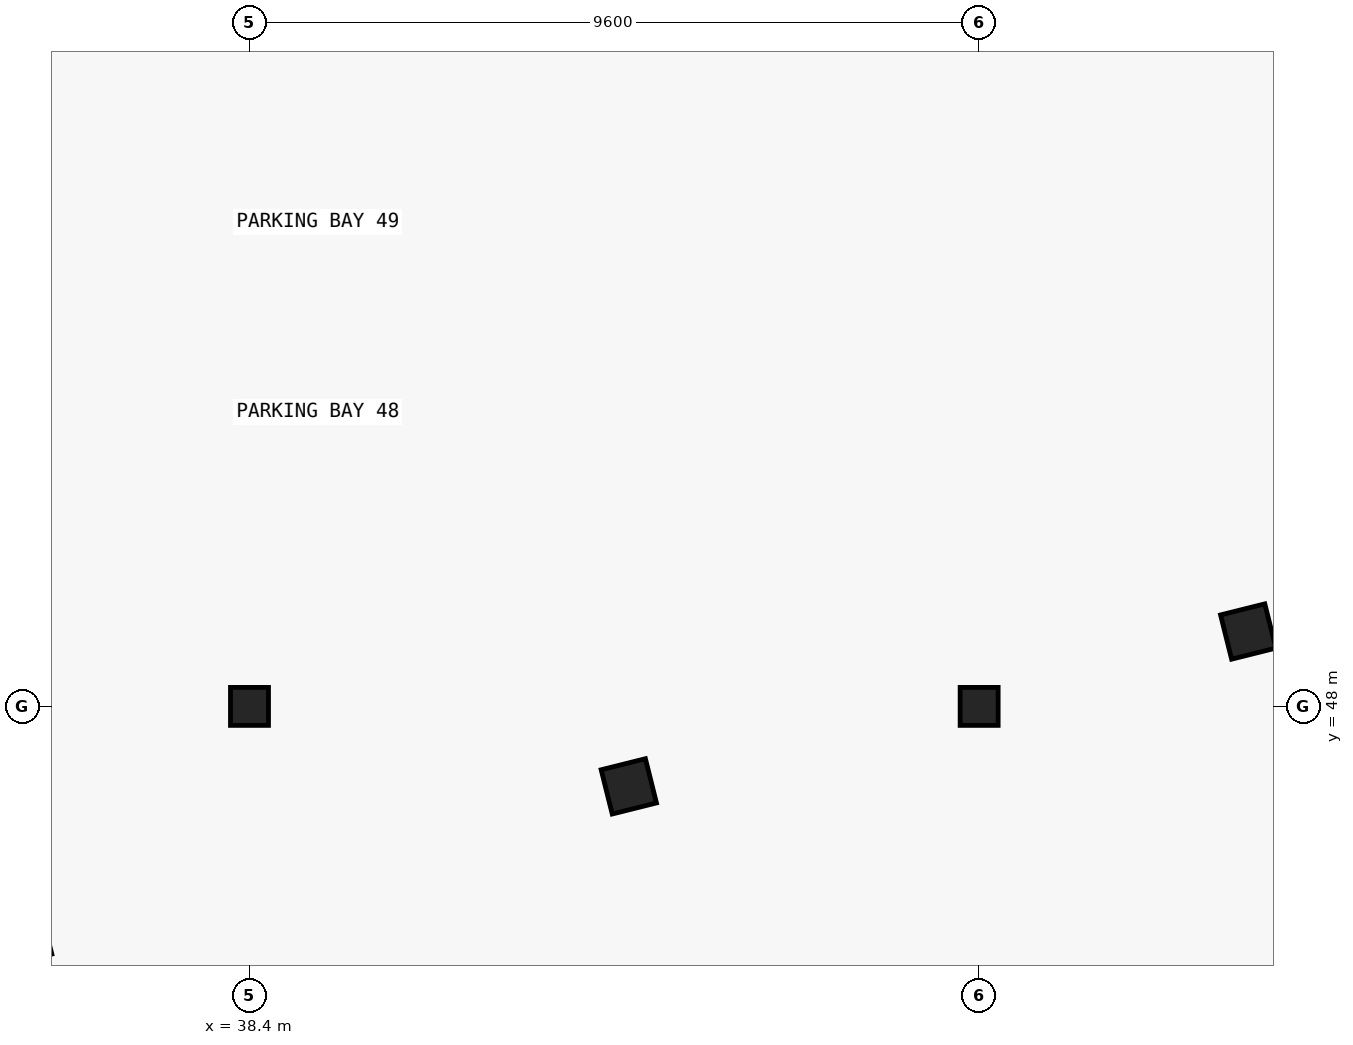
"""IFC4 building model, lengths in metres.
Left out: names, types, materials, properties, quantities, classifications, styles, units other than length and angle.
Written with IfcOpenShell. Run it as: python <this file> out.ifc"""

import sys

from ifc_helpers import new_model, si_unit, direction, frame, origin, origin_2d, place, context, subcontext, project, spatial, rectangle, extrude, element, save


model = new_model("IFC4")
c1 = context("Model", 3, precision=1e-05, world=origin(), true_north=direction((0.0, 1.0)))
c2 = subcontext(c1, "Body", "Model", "MODEL_VIEW")
j1 = project(units=[si_unit("LENGTHUNIT", "METRE"), si_unit("PLANEANGLEUNIT", "RADIAN")], contexts=[c1])
p1 = place(None, origin())
s1 = spatial("IfcSite", under=j1, at=p1, CompositionType="ELEMENT")
p2 = place(p1, origin())
s2 = spatial("IfcBuilding", under=s1, at=p2, CompositionType="ELEMENT")
p3 = place(p2, frame((0.0, 0.0, -4.55)))
s3 = spatial("IfcBuildingStorey", under=s2, at=p3, CompositionType="ELEMENT", Elevation=-4.55)
for number, where, z_axis, x_axis in (
    (1, (38.4, 48.0, 0.0), (0.0, 0.0, 1.0), (1.0, 0.0, 0.0)),
    (2, (48.0, 48.0, 0.0), (0.0, 0.0, 1.0), (1.0, 0.0, 0.0)),
):
    element("IfcColumn", number, at=place(p3, frame(where, z_axis=z_axis, x_axis=x_axis)), inside=s3, PredefinedType="COLUMN", context=c2, shape_type="SweptSolid", body=[
        extrude(rectangle(XDim=0.5, YDim=0.5, at=origin_2d()), origin(), (0.0, 0.0, 1.0), 4.55),
    ])
for number, where, z_axis, x_axis in (
    (3, (43.391, 46.948, 0.0), (0.0, 0.0, 1.0), (0.97, 0.243, 0.0)),
    (4, (51.54, 48.985, 0.0), (0.0, 0.0, 1.0), (0.97, 0.243, 0.0)),
):
    element("IfcColumn", number, at=place(p3, frame(where, z_axis=z_axis, x_axis=x_axis)), inside=s3, PredefinedType="COLUMN", context=c2, shape_type="SweptSolid", body=[
        extrude(rectangle(XDim=0.6, YDim=0.6, at=origin_2d()), origin(), (0.0, 0.0, 1.0), 4.55),
    ])
save(model, sys.argv[1])
